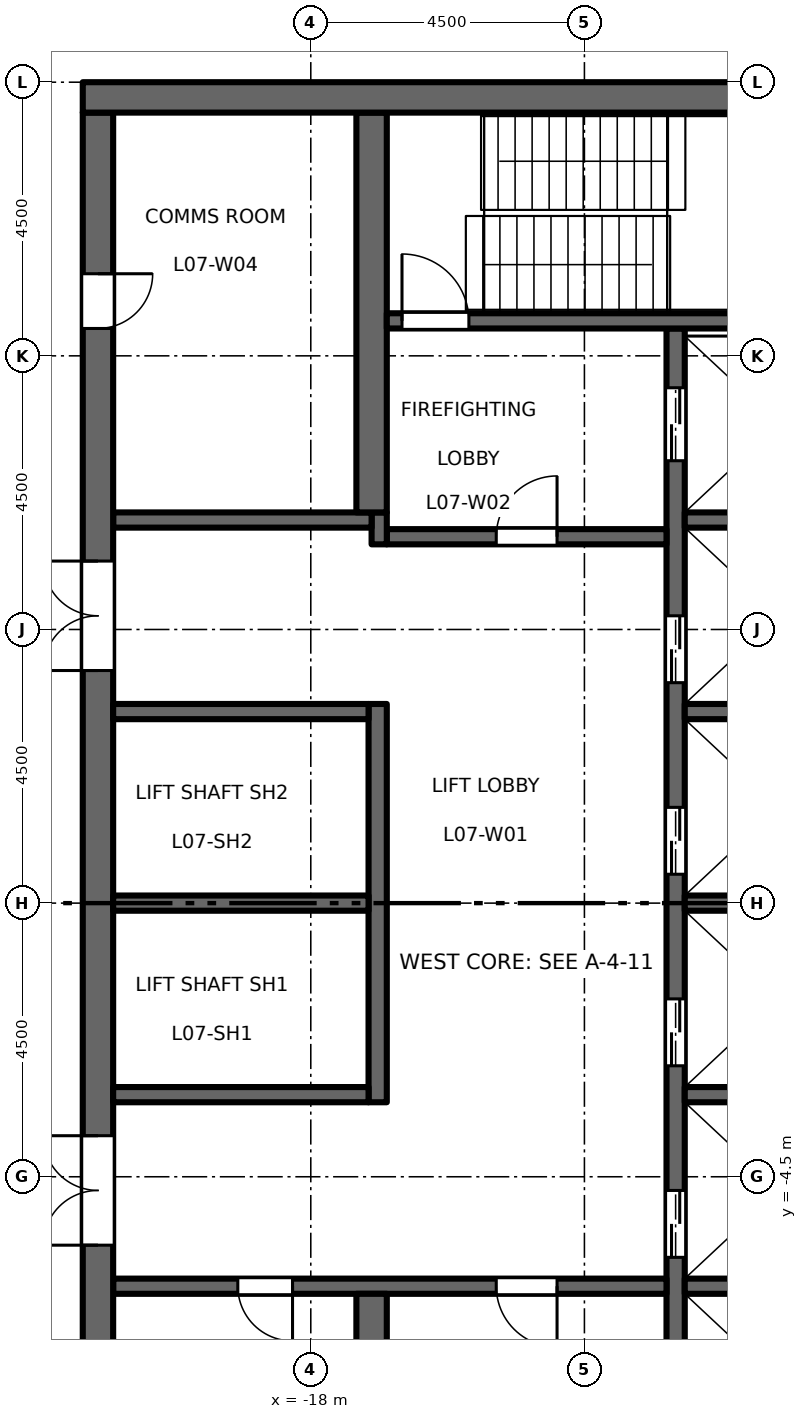
"""IFC4 building model, lengths in metres.
Left out: names, types, materials, properties, quantities, classifications, styles, units other than length and angle.
Written with IfcOpenShell. Run it as: python <this file> out.ifc"""

import sys

from ifc_helpers import new_model, si_unit, direction, frame, frame_2d, origin, place, context, subcontext, project, spatial, rectangle, extrude, element, fill, save


model = new_model("IFC4")
c1 = context("Model", 3, precision=1e-05, world=origin(), true_north=direction((0.0, 1.0)))
c2 = subcontext(c1, "Body", "Model", "MODEL_VIEW")
j1 = project(units=[si_unit("LENGTHUNIT", "METRE"), si_unit("PLANEANGLEUNIT", "RADIAN")], contexts=[c1])
p1 = place(None, origin())
s1 = spatial("IfcSite", under=j1, at=p1, CompositionType="ELEMENT")
p2 = place(p1, origin())
s2 = spatial("IfcBuilding", under=s1, at=p2, CompositionType="ELEMENT")
p3 = place(p2, frame((0.0, 0.0, 35.7)))
s3 = spatial("IfcBuildingStorey", under=s2, at=p3, CompositionType="ELEMENT", Elevation=35.7)
p4 = place(p3, frame((-12.0, -9.45, 0.0), z_axis=(0.0, 0.0, 1.0), x_axis=(0.0, 1.0, 0.0)))
e1 = element("IfcWall", 1, at=p4, inside=s3, PredefinedType="SHEAR", context=c2, shape_type="SweptSolid", body=[
    extrude(rectangle(XDim=18.9, YDim=0.3, at=frame_2d((9.45, 0.0))), origin(), (0.0, 0.0, 1.0), 4.35),
])
p5 = place(p4, frame((3.625, 0.0, 0.0)))
e2 = element("IfcOpeningElement", 2, at=p5, cuts=e1, PredefinedType="OPENING", context=c2, shape_type="SweptSolid", body=[
    extrude(rectangle(XDim=1.1, YDim=2.1, at=frame_2d((0.55, 1.05))), frame((0.0, 0.16, 0.0), z_axis=(0.0, -1.0, 0.0), x_axis=(1.0, 0.0, 0.0)), (0.0, 0.0, 1.0), 0.32),
])
p6 = place(p4, frame((6.775, 0.0, 0.0)))
e3 = element("IfcOpeningElement", 3, at=p6, cuts=e1, PredefinedType="OPENING", context=c2, shape_type="SweptSolid", body=[
    extrude(rectangle(XDim=1.1, YDim=2.1, at=frame_2d((0.55, 1.05))), frame((0.0, 0.16, 0.0), z_axis=(0.0, -1.0, 0.0), x_axis=(1.0, 0.0, 0.0)), (0.0, 0.0, 1.0), 0.32),
])
p7 = place(p4, frame((9.925, 0.0, 0.0)))
e4 = element("IfcOpeningElement", 4, at=p7, cuts=e1, PredefinedType="OPENING", context=c2, shape_type="SweptSolid", body=[
    extrude(rectangle(XDim=1.1, YDim=2.1, at=frame_2d((0.55, 1.05))), frame((0.0, 0.16, 0.0), z_axis=(0.0, -1.0, 0.0), x_axis=(1.0, 0.0, 0.0)), (0.0, 0.0, 1.0), 0.32),
])
p8 = place(p4, frame((13.075, 0.0, 0.0)))
e5 = element("IfcOpeningElement", 5, at=p8, cuts=e1, PredefinedType="OPENING", context=c2, shape_type="SweptSolid", body=[
    extrude(rectangle(XDim=1.1, YDim=2.1, at=frame_2d((0.55, 1.05))), frame((0.0, 0.16, 0.0), z_axis=(0.0, -1.0, 0.0), x_axis=(1.0, 0.0, 0.0)), (0.0, 0.0, 1.0), 0.32),
])
p9 = place(p4, frame((16.725, 0.0, 0.0)))
e6 = element("IfcOpeningElement", 6, at=p9, cuts=e1, PredefinedType="OPENING", context=c2, shape_type="SweptSolid", body=[
    extrude(rectangle(XDim=1.2, YDim=2.1, at=frame_2d((0.6, 1.05))), frame((0.0, 0.16, 0.0), z_axis=(0.0, -1.0, 0.0), x_axis=(1.0, 0.0, 0.0)), (0.0, 0.0, 1.0), 0.32),
])
p10 = place(p4, frame((0.975, 0.0, 0.0)))
e7 = element("IfcOpeningElement", 7, at=p10, cuts=e1, PredefinedType="OPENING", context=c2, shape_type="SweptSolid", body=[
    extrude(rectangle(XDim=1.2, YDim=2.1, at=frame_2d((0.6, 1.05))), frame((0.0, 0.16, 0.0), z_axis=(0.0, -1.0, 0.0), x_axis=(1.0, 0.0, 0.0)), (0.0, 0.0, 1.0), 0.32),
])
p11 = place(p3, frame((-12.15, 6.025, 0.0), z_axis=(0.0, 0.0, 1.0), x_axis=(-1.0, 0.0, 0.0)))
e8 = element("IfcWall", 8, at=p11, inside=s3, PredefinedType="SHEAR", context=c2, shape_type="SweptSolid", body=[
    extrude(rectangle(XDim=4.6, YDim=0.25, at=frame_2d((2.3, 0.0))), origin(), (0.0, 0.0, 1.0), 4.35),
])
p12 = place(p11, frame((1.8, 0.0, 0.0)))
e9 = element("IfcOpeningElement", 9, at=p12, cuts=e8, PredefinedType="OPENING", context=c2, shape_type="SweptSolid", body=[
    extrude(rectangle(XDim=1.0, YDim=2.1, at=frame_2d((0.5, 1.05))), frame((0.0, 0.135, 0.0), z_axis=(0.0, -1.0, 0.0), x_axis=(1.0, 0.0, 0.0)), (0.0, 0.0, 1.0), 0.27),
])
p13 = place(p3, frame((-16.875, 5.9, 0.0), z_axis=(0.0, 0.0, 1.0), x_axis=(0.0, 1.0, 0.0)))
e10 = element("IfcWall", 10, at=p13, inside=s3, PredefinedType="SHEAR", context=c2, shape_type="SweptSolid", body=[
    extrude(rectangle(XDim=0.525, YDim=0.25, at=frame_2d((0.263, 0.0))), origin(), (0.0, 0.0, 1.0), 4.35),
])
p14 = place(p3, frame((-17.0, 6.3, 0.0), z_axis=(0.0, 0.0, 1.0), x_axis=(-1.0, 0.0, 0.0)))
e11 = element("IfcWall", 11, at=p14, inside=s3, PredefinedType="SHEAR", context=c2, shape_type="SweptSolid", body=[
    extrude(rectangle(XDim=4.25, YDim=0.25, at=frame_2d((2.125, 0.0))), origin(), (0.0, 0.0, 1.0), 4.35),
])
p15 = place(p3, frame((-12.15, -6.3, 0.0), z_axis=(0.0, 0.0, 1.0), x_axis=(-1.0, 0.0, 0.0)))
e12 = element("IfcWall", 12, at=p15, inside=s3, PredefinedType="SHEAR", context=c2, shape_type="SweptSolid", body=[
    extrude(rectangle(XDim=9.1, YDim=0.25, at=frame_2d((4.55, 0.0))), origin(), (0.0, 0.0, 1.0), 4.35),
])
p16 = place(p15, frame((1.8, 0.0, 0.0)))
e13 = element("IfcOpeningElement", 13, at=p16, cuts=e12, PredefinedType="OPENING", context=c2, shape_type="SweptSolid", body=[
    extrude(rectangle(XDim=1.0, YDim=2.1, at=frame_2d((0.5, 1.05))), frame((0.0, 0.135, 0.0), z_axis=(0.0, -1.0, 0.0), x_axis=(1.0, 0.0, 0.0)), (0.0, 0.0, 1.0), 0.27),
])
p17 = place(p15, frame((6.15, 0.0, 0.0)))
e14 = element("IfcOpeningElement", 14, at=p17, cuts=e12, PredefinedType="OPENING", context=c2, shape_type="SweptSolid", body=[
    extrude(rectangle(XDim=0.9, YDim=2.1, at=frame_2d((0.45, 1.05))), frame((0.0, 0.135, 0.0), z_axis=(0.0, -1.0, 0.0), x_axis=(1.0, 0.0, 0.0)), (0.0, 0.0, 1.0), 0.27),
])
p18 = place(p3, frame((-21.5, -13.0, 0.0), z_axis=(0.0, 0.0, 1.0), x_axis=(0.0, 1.0, 0.0)))
e15 = element("IfcWall", 15, at=p18, inside=s3, PredefinedType="SHEAR", context=c2, shape_type="SweptSolid", body=[
    extrude(rectangle(XDim=26.0, YDim=0.5, at=frame_2d((13.0, 0.0))), origin(), (0.0, 0.0, 1.0), 4.35),
])
p19 = place(p18, frame((16.825, 0.0, 0.0)))
e16 = element("IfcOpeningElement", 16, at=p19, cuts=e15, PredefinedType="OPENING", context=c2, shape_type="SweptSolid", body=[
    extrude(rectangle(XDim=1.8, YDim=2.1, at=frame_2d((0.9, 1.05))), frame((0.0, 0.26, 0.0), z_axis=(0.0, -1.0, 0.0), x_axis=(1.0, 0.0, 0.0)), (0.0, 0.0, 1.0), 0.52),
])
p20 = place(p18, frame((7.375, 0.0, 0.0)))
e17 = element("IfcOpeningElement", 17, at=p20, cuts=e15, PredefinedType="OPENING", context=c2, shape_type="SweptSolid", body=[
    extrude(rectangle(XDim=1.8, YDim=2.1, at=frame_2d((0.9, 1.05))), frame((0.0, 0.26, 0.0), z_axis=(0.0, -1.0, 0.0), x_axis=(1.0, 0.0, 0.0)), (0.0, 0.0, 1.0), 0.52),
])
p21 = place(p18, frame((22.45, 0.0, 0.0)))
e18 = element("IfcOpeningElement", 18, at=p21, cuts=e15, PredefinedType="OPENING", context=c2, shape_type="SweptSolid", body=[
    extrude(rectangle(XDim=0.9, YDim=2.1, at=frame_2d((0.45, 1.05))), frame((0.0, 0.26, 0.0), z_axis=(0.0, -1.0, 0.0), x_axis=(1.0, 0.0, 0.0)), (0.0, 0.0, 1.0), 0.52),
])
p22 = place(p18, frame((1.7, 0.0, 0.0)))
e19 = element("IfcOpeningElement", 19, at=p22, cuts=e15, PredefinedType="OPENING", context=c2, shape_type="SweptSolid", body=[
    extrude(rectangle(XDim=0.9, YDim=2.1, at=frame_2d((0.45, 1.05))), frame((0.0, 0.26, 0.0), z_axis=(0.0, -1.0, 0.0), x_axis=(1.0, 0.0, 0.0)), (0.0, 0.0, 1.0), 0.52),
])
p23 = place(p3, frame((-16.9, -3.275, 0.0), z_axis=(0.0, 0.0, 1.0), x_axis=(0.0, 1.0, 0.0)))
e20 = element("IfcWall", 20, at=p23, inside=s3, PredefinedType="SHEAR", context=c2, shape_type="SweptSolid", body=[
    extrude(rectangle(XDim=6.55, YDim=0.3, at=frame_2d((3.275, 0.0))), origin(), (0.0, 0.0, 1.0), 4.35),
])
for number, where, z_axis, x_axis in (
    (21, (-17.05, 0.0, 0.0), (0.0, 0.0, 1.0), (-1.0, 0.0, 0.0)),
    (22, (-17.05, 3.15, 0.0), (0.0, 0.0, 1.0), (-1.0, 0.0, 0.0)),
    (23, (-17.05, -3.15, 0.0), (0.0, 0.0, 1.0), (-1.0, 0.0, 0.0)),
):
    element("IfcWall", number, at=place(p3, frame(where, z_axis=z_axis, x_axis=x_axis)), inside=s3, PredefinedType="SHEAR", context=c2, shape_type="SweptSolid", body=[
        extrude(rectangle(XDim=4.2, YDim=0.25, at=frame_2d((2.1, 0.0))), origin(), (0.0, 0.0, 1.0), 4.35),
    ])
for number, where, z_axis, x_axis in (
    (24, (-17.0, 6.425, 0.0), (0.0, 0.0, 1.0), (0.0, 1.0, 0.0)),
    (25, (-17.0, -13.0, 0.0), (0.0, 0.0, 1.0), (0.0, 1.0, 0.0)),
):
    element("IfcWall", number, at=place(p3, frame(where, z_axis=z_axis, x_axis=x_axis)), inside=s3, PredefinedType="SHEAR", context=c2, shape_type="SweptSolid", body=[
        extrude(rectangle(XDim=6.575, YDim=0.5, at=frame_2d((3.288, 0.0))), origin(), (0.0, 0.0, 1.0), 4.35),
    ])
for number, where, z_axis, x_axis in (
    (26, (-8.75, 0.0, 0.0), (0.0, 0.0, 1.0), (-1.0, 0.0, 0.0)),
    (27, (-8.75, 3.15, 0.0), (0.0, 0.0, 1.0), (-1.0, 0.0, 0.0)),
    (28, (-8.75, 6.3, 0.0), (0.0, 0.0, 1.0), (-1.0, 0.0, 0.0)),
    (29, (-8.75, -3.15, 0.0), (0.0, 0.0, 1.0), (-1.0, 0.0, 0.0)),
    (30, (-8.75, -6.3, 0.0), (0.0, 0.0, 1.0), (-1.0, 0.0, 0.0)),
):
    element("IfcWall", number, at=place(p3, frame(where, z_axis=z_axis, x_axis=x_axis)), inside=s3, PredefinedType="SHEAR", context=c2, shape_type="SweptSolid", body=[
        extrude(rectangle(XDim=3.1, YDim=0.25, at=frame_2d((1.55, 0.0))), origin(), (0.0, 0.0, 1.0), 4.35),
    ])
p24 = place(p3, frame((-8.75, 9.575, 0.0), z_axis=(0.0, 0.0, 1.0), x_axis=(-1.0, 0.0, 0.0)))
e31 = element("IfcWall", 31, at=p24, inside=s3, PredefinedType="SHEAR", context=c2, shape_type="SweptSolid", body=[
    extrude(rectangle(XDim=8.0, YDim=0.25, at=frame_2d((4.0, 0.0))), origin(), (0.0, 0.0, 1.0), 4.35),
])
p25 = place(p24, frame((6.65, 0.0, 0.0)))
e32 = element("IfcOpeningElement", 32, at=p25, cuts=e31, PredefinedType="OPENING", context=c2, shape_type="SweptSolid", body=[
    extrude(rectangle(XDim=1.1, YDim=2.1, at=frame_2d((0.55, 1.05))), frame((0.0, 0.135, 0.0), z_axis=(0.0, -1.0, 0.0), x_axis=(1.0, 0.0, 0.0)), (0.0, 0.0, 1.0), 0.27),
])
p26 = place(p3, frame((-8.25, 13.25, 0.0), z_axis=(0.0, 0.0, 1.0), x_axis=(-1.0, 0.0, 0.0)))
e33 = element("IfcWall", 33, at=p26, inside=s3, PredefinedType="SHEAR", context=c2, shape_type="SweptSolid", body=[
    extrude(rectangle(XDim=13.5, YDim=0.5, at=frame_2d((6.75, 0.0))), origin(), (0.0, 0.0, 1.0), 4.35),
])
p27 = place(p12, origin())
e34 = element("IfcDoor", 34, at=p27, inside=s3, OperationType="SINGLE_SWING_LEFT", PredefinedType="DOOR", context=c2, shape_type="SweptSolid", body=[
    extrude(rectangle(XDim=1.0, YDim=2.1, at=frame_2d((0.5, 1.05))), frame((0.0, 0.025, 0.0), z_axis=(0.0, -1.0, 0.0), x_axis=(1.0, 0.0, 0.0)), (0.0, 0.0, 1.0), 0.05),
])
fill(e9, e34)
p28 = place(p16, origin())
e35 = element("IfcDoor", 35, at=p28, inside=s3, OperationType="SINGLE_SWING_RIGHT", PredefinedType="DOOR", context=c2, shape_type="SweptSolid", body=[
    extrude(rectangle(XDim=1.0, YDim=2.1, at=frame_2d((0.5, 1.05))), frame((0.0, 0.025, 0.0), z_axis=(0.0, -1.0, 0.0), x_axis=(1.0, 0.0, 0.0)), (0.0, 0.0, 1.0), 0.05),
])
fill(e13, e35)
p29 = place(p25, origin())
e36 = element("IfcDoor", 36, at=p29, inside=s3, OperationType="SINGLE_SWING_RIGHT", PredefinedType="DOOR", context=c2, shape_type="SweptSolid", body=[
    extrude(rectangle(XDim=1.1, YDim=2.1, at=frame_2d((0.55, 1.05))), frame((0.0, 0.025, 0.0), z_axis=(0.0, -1.0, 0.0), x_axis=(1.0, 0.0, 0.0)), (0.0, 0.0, 1.0), 0.05),
])
fill(e32, e36)
p30 = place(p19, origin())
e37 = element("IfcDoor", 37, at=p30, inside=s3, OperationType="DOUBLE_DOOR_DOUBLE_SWING", PredefinedType="DOOR", context=c2, shape_type="SweptSolid", body=[
    extrude(rectangle(XDim=1.8, YDim=2.1, at=frame_2d((0.9, 1.05))), frame((0.0, 0.025, 0.0), z_axis=(0.0, -1.0, 0.0), x_axis=(1.0, 0.0, 0.0)), (0.0, 0.0, 1.0), 0.05),
])
fill(e16, e37)
p31 = place(p20, origin())
e38 = element("IfcDoor", 38, at=p31, inside=s3, OperationType="DOUBLE_DOOR_DOUBLE_SWING", PredefinedType="DOOR", context=c2, shape_type="SweptSolid", body=[
    extrude(rectangle(XDim=1.8, YDim=2.1, at=frame_2d((0.9, 1.05))), frame((0.0, 0.025, 0.0), z_axis=(0.0, -1.0, 0.0), x_axis=(1.0, 0.0, 0.0)), (0.0, 0.0, 1.0), 0.05),
])
fill(e17, e38)
p32 = place(p5, origin())
e39 = element("IfcDoor", 39, at=p32, inside=s3, OperationType="DOUBLE_DOOR_SLIDING", PredefinedType="DOOR", context=c2, shape_type="SweptSolid", body=[
    extrude(rectangle(XDim=1.1, YDim=2.1, at=frame_2d((0.55, 1.05))), frame((0.0, 0.025, 0.0), z_axis=(0.0, -1.0, 0.0), x_axis=(1.0, 0.0, 0.0)), (0.0, 0.0, 1.0), 0.05),
])
fill(e2, e39)
p33 = place(p6, origin())
e40 = element("IfcDoor", 40, at=p33, inside=s3, OperationType="DOUBLE_DOOR_SLIDING", PredefinedType="DOOR", context=c2, shape_type="SweptSolid", body=[
    extrude(rectangle(XDim=1.1, YDim=2.1, at=frame_2d((0.55, 1.05))), frame((0.0, 0.025, 0.0), z_axis=(0.0, -1.0, 0.0), x_axis=(1.0, 0.0, 0.0)), (0.0, 0.0, 1.0), 0.05),
])
fill(e3, e40)
p34 = place(p7, origin())
e41 = element("IfcDoor", 41, at=p34, inside=s3, OperationType="DOUBLE_DOOR_SLIDING", PredefinedType="DOOR", context=c2, shape_type="SweptSolid", body=[
    extrude(rectangle(XDim=1.1, YDim=2.1, at=frame_2d((0.55, 1.05))), frame((0.0, 0.025, 0.0), z_axis=(0.0, -1.0, 0.0), x_axis=(1.0, 0.0, 0.0)), (0.0, 0.0, 1.0), 0.05),
])
fill(e4, e41)
p35 = place(p8, origin())
e42 = element("IfcDoor", 42, at=p35, inside=s3, OperationType="DOUBLE_DOOR_SLIDING", PredefinedType="DOOR", context=c2, shape_type="SweptSolid", body=[
    extrude(rectangle(XDim=1.1, YDim=2.1, at=frame_2d((0.55, 1.05))), frame((0.0, 0.025, 0.0), z_axis=(0.0, -1.0, 0.0), x_axis=(1.0, 0.0, 0.0)), (0.0, 0.0, 1.0), 0.05),
])
fill(e5, e42)
p36 = place(p9, origin())
e43 = element("IfcDoor", 43, at=p36, inside=s3, OperationType="DOUBLE_DOOR_SLIDING", PredefinedType="DOOR", context=c2, shape_type="SweptSolid", body=[
    extrude(rectangle(XDim=1.2, YDim=2.1, at=frame_2d((0.6, 1.05))), frame((0.0, 0.025, 0.0), z_axis=(0.0, -1.0, 0.0), x_axis=(1.0, 0.0, 0.0)), (0.0, 0.0, 1.0), 0.05),
])
fill(e6, e43)
p37 = place(p21, origin())
e44 = element("IfcDoor", 44, at=p37, inside=s3, OperationType="SINGLE_SWING_RIGHT", PredefinedType="DOOR", context=c2, shape_type="SweptSolid", body=[
    extrude(rectangle(XDim=0.9, YDim=2.1, at=frame_2d((0.45, 1.05))), frame((0.0, 0.025, 0.0), z_axis=(0.0, -1.0, 0.0), x_axis=(1.0, 0.0, 0.0)), (0.0, 0.0, 1.0), 0.05),
])
fill(e18, e44)
p38 = place(p17, origin())
e45 = element("IfcDoor", 45, at=p38, inside=s3, OperationType="SINGLE_SWING_RIGHT", PredefinedType="DOOR", context=c2, shape_type="SweptSolid", body=[
    extrude(rectangle(XDim=0.9, YDim=2.1, at=frame_2d((0.45, 1.05))), frame((0.0, 0.025, 0.0), z_axis=(0.0, -1.0, 0.0), x_axis=(1.0, 0.0, 0.0)), (0.0, 0.0, 1.0), 0.05),
])
fill(e14, e45)
save(model, sys.argv[1])
